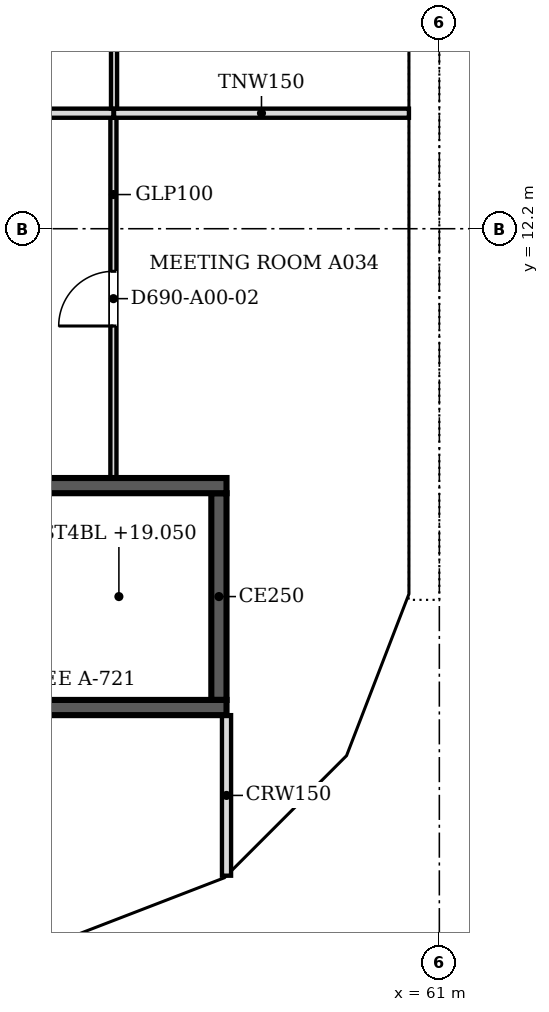
"""IFC4 building model, lengths in metres.
Left out: names, types, materials, properties, quantities, classifications, styles, units other than length and angle.
Written with IfcOpenShell. Run it as: python <this file> out.ifc"""

import sys

from ifc_helpers import new_model, si_unit, direction, frame, frame_2d, origin, place, context, subcontext, project, spatial, polyline, rectangle, outline, extrude, faceted_brep, source, transform, mapped, element, fill, save


model = new_model("IFC4")
c1 = context("Model", 3, precision=1e-05, world=origin(), true_north=direction((0.0, 1.0)))
c2 = subcontext(c1, "Body", "Model", "MODEL_VIEW")
j1 = project(units=[si_unit("LENGTHUNIT", "METRE"), si_unit("PLANEANGLEUNIT", "RADIAN")], contexts=[c1])
p1 = place(None, origin())
s1 = spatial("IfcSite", under=j1, at=p1, CompositionType="ELEMENT")
p2 = place(p1, origin())
s2 = spatial("IfcBuilding", under=s1, at=p2, CompositionType="ELEMENT")
p3 = place(p2, frame((0.0, 0.0, 16.8)))
s3 = spatial("IfcBuildingStorey", under=s2, at=p3, CompositionType="ELEMENT", Elevation=16.8)
m1 = source(origin(), c2, "Body", "Brep", [
    faceted_brep([(2.997, -0.25, 0.0), (0.047, -0.25, 4.5), (0.0, -0.25, 4.43), (0.0, -0.25, 0.0), (0.093, 0.25, 4.429), (2.944, 0.25, 0.081), (2.944, 0.25, 0.0), (0.093, 0.25, 0.0), (0.047, 0.0, 4.5), (2.997, 0.0, 0.0)], [[[0, 1, 2, 3]], [[4, 5, 6, 7]], [[5, 4, 8, 1, 0, 9]], [[2, 1, 8]], [[7, 6, 9, 0, 3]], [[7, 3, 2, 8, 4]], [[9, 6, 5]]]),
])
p4 = place(p3, frame((54.81, 0.233, 0.0), z_axis=(0.0, 0.0, 1.0), x_axis=(0.932990326376, 0.359901446078, 0.0)))
e1 = element("IfcWall", 1, at=p4, inside=s3, PredefinedType="SOLIDWALL", context=c2, shape_type="MappedRepresentation", body=[
    mapped(m1, transform((0.0, 0.0, 0.0), scale=1.0)),
])
m2 = source(origin(), c2, "Body", "SweptSolid", [
    extrude(outline(polyline([(2.534, 0.25), (0.247, 3.739), (0.247, 0.25), (2.534, 0.25)])), frame((0.0, 0.26, 0.0), z_axis=(0.0, -1.0, 0.0), x_axis=(1.0, 0.0, 0.0)), (0.0, 0.0, 1.0), 0.52),
])
p5 = place(p4, origin())
e2 = element("IfcOpeningElement", 2, at=p5, cuts=e1, PredefinedType="OPENING", context=c2, shape_type="MappedRepresentation", body=[
    mapped(m2, transform((0.0, 0.0, 0.0), scale=1.0)),
])
m3 = source(origin(), c2, "Body", "Brep", [
    faceted_brep([(2.997, -0.25, 4.419), (2.944, -0.25, 4.5), (0.0, -0.25, 0.0), (2.997, -0.25, 0.0), (0.053, 0.25, 0.081), (2.891, 0.25, 4.419), (2.891, 0.25, 0.0), (0.053, 0.25, 0.0), (2.944, 0.0, 4.5), (0.0, 0.0, 0.0)], [[[0, 1, 2, 3]], [[4, 5, 6, 7]], [[8, 1, 0]], [[5, 4, 9, 2, 1, 8]], [[7, 6, 3, 2, 9]], [[7, 9, 4]], [[3, 6, 5, 8, 0]]]),
])
p6 = place(p3, frame((57.606, 1.312, 0.0), z_axis=(0.0, 0.0, 1.0), x_axis=(0.707147509625, 0.707066050402, 0.0)))
e3 = element("IfcWall", 3, at=p6, inside=s3, PredefinedType="SOLIDWALL", context=c2, shape_type="MappedRepresentation", body=[
    mapped(m3, transform((0.0, 0.0, 0.0), scale=1.0)),
])
m4 = source(origin(), c2, "Body", "SweptSolid", [
    extrude(outline(polyline([(2.744, 3.738), (0.462, 0.25), (2.744, 0.25), (2.744, 3.738)])), frame((0.0, 0.26, 0.0), z_axis=(0.0, -1.0, 0.0), x_axis=(1.0, 0.0, 0.0)), (0.0, 0.0, 1.0), 0.52),
])
p7 = place(p6, origin())
e4 = element("IfcOpeningElement", 4, at=p7, cuts=e3, PredefinedType="OPENING", context=c2, shape_type="MappedRepresentation", body=[
    mapped(m4, transform((0.0, 0.0, 0.0), scale=1.0)),
])
m5 = source(origin(), c2, "Body", "Brep", [
    faceted_brep([(3.003, -0.25, 0.0), (0.053, -0.25, 4.5), (0.0, -0.25, 4.419), (0.0, -0.25, 0.0), (0.106, 0.25, 4.419), (2.957, 0.25, 0.071), (2.957, 0.25, 0.0), (0.106, 0.25, 0.0), (0.053, 0.0, 4.5), (3.003, 0.0, 0.0)], [[[0, 1, 2, 3]], [[4, 5, 6, 7]], [[5, 4, 8, 1, 0, 9]], [[2, 1, 8]], [[7, 6, 9, 0, 3]], [[7, 3, 2, 8, 4]], [[9, 6, 5]]]),
])
p8 = place(p3, frame((59.669, 3.344, 0.0), z_axis=(0.0, 0.0, 1.0), x_axis=(0.35992665181, 0.932980602862, 0.0)))
e5 = element("IfcWall", 5, at=p8, inside=s3, PredefinedType="SOLIDWALL", context=c2, shape_type="MappedRepresentation", body=[
    mapped(m5, transform((0.0, 0.0, 0.0), scale=1.0)),
])
m6 = source(origin(), c2, "Body", "SweptSolid", [
    extrude(outline(polyline([(2.541, 0.25), (0.253, 3.739), (0.253, 0.25), (2.541, 0.25)])), frame((0.0, 0.26, 0.0), z_axis=(0.0, -1.0, 0.0), x_axis=(1.0, 0.0, 0.0)), (0.0, 0.0, 1.0), 0.52),
])
p9 = place(p8, origin())
e6 = element("IfcOpeningElement", 6, at=p9, cuts=e5, PredefinedType="OPENING", context=c2, shape_type="MappedRepresentation", body=[
    mapped(m6, transform((0.0, 0.0, 0.0), scale=1.0)),
])
m7 = source(origin(), c2, "Body", "Brep", [
    faceted_brep([(6.053, -0.25, 0.0), (3.003, -0.25, 4.5), (0.0, -0.25, 0.0), (0.047, 0.25, 0.07), (3.003, 0.25, 4.5), (6.053, 0.25, 0.0), (0.047, 0.25, 0.0), (0.0, 0.0, 0.0)], [[[0, 1, 2]], [[3, 4, 5, 6]], [[5, 4, 1, 0]], [[4, 3, 7, 2, 1]], [[6, 5, 0, 2, 7]], [[6, 7, 3]]]),
])
p10 = place(p3, frame((60.75, 6.146, 0.0), z_axis=(0.0, 0.0, 1.0), x_axis=(0.0, 1.0, 0.0)))
e7 = element("IfcWall", 7, at=p10, inside=s3, PredefinedType="SOLIDWALL", context=c2, shape_type="MappedRepresentation", body=[
    mapped(m7, transform((0.0, 0.0, 0.0), scale=1.0)),
])
m8 = source(origin(), c2, "Body", "SweptSolid", [
    extrude(outline(polyline([(5.582, 0.25), (3.005, 4.052), (0.468, 0.25), (5.582, 0.25)])), frame((0.0, 0.26, 0.0), z_axis=(0.0, -1.0, 0.0), x_axis=(1.0, 0.0, 0.0)), (0.0, 0.0, 1.0), 0.52),
])
p11 = place(p10, origin())
e8 = element("IfcOpeningElement", 8, at=p11, cuts=e7, PredefinedType="OPENING", context=c2, shape_type="MappedRepresentation", body=[
    mapped(m8, transform((0.0, 0.0, 0.0), scale=1.0)),
])
m9 = source(origin(), c2, "Body", "SweptSolid", [
    extrude(outline(polyline([(6.1, 0.0), (3.05, 4.5), (0.0, 0.0), (6.1, 0.0)])), frame((0.0, 0.25, 0.0), z_axis=(0.0, -1.0, 0.0), x_axis=(1.0, 0.0, 0.0)), (0.0, 0.0, 1.0), 0.5),
])
p12 = place(p3, frame((60.75, 12.2, 0.0), z_axis=(0.0, 0.0, 1.0), x_axis=(0.0, 1.0, 0.0)))
e9 = element("IfcWall", 9, at=p12, inside=s3, PredefinedType="SOLIDWALL", context=c2, shape_type="MappedRepresentation", body=[
    mapped(m9, transform((0.0, 0.0, 0.0), scale=1.0)),
])
m10 = source(origin(), c2, "Body", "SweptSolid", [
    extrude(outline(polyline([(5.629, 0.25), (3.05, 4.054), (0.471, 0.25), (5.629, 0.25)])), frame((0.0, 0.26, 0.0), z_axis=(0.0, -1.0, 0.0), x_axis=(1.0, 0.0, 0.0)), (0.0, 0.0, 1.0), 0.52),
])
p13 = place(p12, origin())
e10 = element("IfcOpeningElement", 10, at=p13, cuts=e9, PredefinedType="OPENING", context=c2, shape_type="MappedRepresentation", body=[
    mapped(m10, transform((0.0, 0.0, 0.0), scale=1.0)),
])
p14 = place(p2, frame((0.0, 0.0, 21.3)))
s4 = spatial("IfcBuildingStorey", under=s2, at=p14, CompositionType="ELEMENT", Elevation=21.3)
m11 = source(origin(), c2, "Body", "Brep", [
    faceted_brep([(2.95, -0.25, 0.0), (3.003, -0.25, 0.081), (3.003, -0.25, 8.919), (2.95, -0.25, 9.0), (0.0, -0.25, 4.5), (0.047, 0.25, 4.571), (2.898, 0.25, 8.919), (2.898, 0.25, 0.081), (0.047, 0.25, 4.429), (2.95, 0.0, 0.0), (2.95, 0.0, 9.0), (0.0, 0.0, 4.5)], [[[0, 1, 2, 3, 4]], [[5, 6, 7, 8]], [[1, 0, 9]], [[10, 3, 2]], [[6, 5, 11, 4, 3, 10]], [[8, 7, 9, 0, 4, 11]], [[8, 11, 5]], [[1, 9, 7, 6, 10, 2]]]),
])
p15 = place(p14, frame((54.854, 0.25, -4.5), z_axis=(0.0, 0.0, 1.0), x_axis=(0.932970071518, 0.359953949349, 0.0)))
e11 = element("IfcWall", 11, at=p15, inside=s4, PredefinedType="SOLIDWALL", context=c2, shape_type="MappedRepresentation", body=[
    mapped(m11, transform((0.0, 0.0, 0.0), scale=1.0)),
])
m12 = source(origin(), c2, "Body", "SweptSolid", [
    extrude(outline(polyline([(2.75, 8.239), (0.299, 4.5), (2.75, 0.761), (2.75, 8.239)])), frame((0.0, 0.26, 0.0), z_axis=(0.0, -1.0, 0.0), x_axis=(1.0, 0.0, 0.0)), (0.0, 0.0, 1.0), 0.52),
])
p16 = place(p15, origin())
e12 = element("IfcOpeningElement", 12, at=p16, cuts=e11, PredefinedType="OPENING", context=c2, shape_type="MappedRepresentation", body=[
    mapped(m12, transform((0.0, 0.0, 0.0), scale=1.0)),
])
m13 = source(origin(), c2, "Body", "Brep", [
    faceted_brep([(0.053, -0.25, 0.0), (2.997, -0.25, 4.5), (0.053, -0.25, 9.0), (0.0, -0.25, 8.919), (0.0, -0.25, 0.081), (0.106, 0.25, 8.919), (2.944, 0.25, 4.581), (2.944, 0.25, 4.419), (0.106, 0.25, 0.081), (2.997, 0.0, 4.5), (0.053, 0.0, 0.0), (0.053, 0.0, 9.0)], [[[0, 1, 2, 3, 4]], [[5, 6, 7, 8]], [[8, 7, 9, 1, 0, 10]], [[6, 5, 11, 2, 1, 9]], [[3, 2, 11]], [[10, 0, 4]], [[8, 10, 4, 3, 11, 5]], [[9, 7, 6]]]),
])
p17 = place(p14, frame((57.569, 1.274, -4.5), z_axis=(0.0, 0.0, 1.0), x_axis=(0.707066050402, 0.707147509625, 0.0)))
e13 = element("IfcWall", 13, at=p17, inside=s4, PredefinedType="SOLIDWALL", context=c2, shape_type="MappedRepresentation", body=[
    mapped(m13, transform((0.0, 0.0, 0.0), scale=1.0)),
])
m14 = source(origin(), c2, "Body", "SweptSolid", [
    extrude(outline(polyline([(0.253, 0.762), (2.698, 4.5), (0.253, 8.238), (0.253, 0.762)])), frame((0.0, 0.26, 0.0), z_axis=(0.0, -1.0, 0.0), x_axis=(1.0, 0.0, 0.0)), (0.0, 0.0, 1.0), 0.52),
])
p18 = place(p17, origin())
e14 = element("IfcOpeningElement", 14, at=p18, cuts=e13, PredefinedType="OPENING", context=c2, shape_type="MappedRepresentation", body=[
    mapped(m14, transform((0.0, 0.0, 0.0), scale=1.0)),
])
m15 = source(origin(), c2, "Body", "Brep", [
    faceted_brep([(2.95, -0.25, 0.0), (2.997, -0.25, 0.07), (2.997, -0.25, 8.93), (2.95, -0.25, 9.0), (0.0, -0.25, 4.5), (0.053, 0.25, 4.581), (2.904, 0.25, 8.929), (2.904, 0.25, 0.071), (0.053, 0.25, 4.419), (2.95, 0.0, 0.0), (2.95, 0.0, 9.0), (0.0, 0.0, 4.5)], [[[0, 1, 2, 3, 4]], [[5, 6, 7, 8]], [[1, 0, 9]], [[10, 3, 2]], [[6, 5, 11, 4, 3, 10]], [[8, 7, 9, 0, 4, 11]], [[8, 11, 5]], [[1, 9, 7, 6, 10, 2]]]),
])
p19 = place(p14, frame((59.688, 3.394, -4.5), z_axis=(0.0, 0.0, 1.0), x_axis=(0.359972353723, 0.932962970624, 0.0)))
e15 = element("IfcWall", 15, at=p19, inside=s4, PredefinedType="SOLIDWALL", context=c2, shape_type="MappedRepresentation", body=[
    mapped(m15, transform((0.0, 0.0, 0.0), scale=1.0)),
])
p20 = place(p19, origin())
e16 = element("IfcOpeningElement", 16, at=p20, cuts=e15, PredefinedType="OPENING", context=c2, shape_type="MappedRepresentation", body=[
    mapped(m12, transform((0.0, 0.0, 0.0), scale=1.0)),
])
m16 = source(origin(), c2, "Body", "Brep", [
    faceted_brep([(0.047, -0.25, 0.0), (3.05, -0.25, 4.5), (0.047, -0.25, 9.0), (0.0, -0.25, 8.929), (0.0, -0.25, 0.071), (0.093, 0.25, 8.93), (3.05, 0.25, 4.5), (0.093, 0.25, 0.07), (0.047, 0.0, 0.0), (0.047, 0.0, 9.0)], [[[0, 1, 2, 3, 4]], [[5, 6, 7]], [[7, 6, 1, 0, 8]], [[6, 5, 9, 2, 1]], [[3, 2, 9]], [[8, 0, 4]], [[7, 8, 4, 3, 9, 5]]]),
])
p21 = place(p14, frame((60.75, 6.1, -4.5), z_axis=(0.0, 0.0, 1.0), x_axis=(0.0, 1.0, 0.0)))
e17 = element("IfcWall", 17, at=p21, inside=s4, PredefinedType="SOLIDWALL", context=c2, shape_type="MappedRepresentation", body=[
    mapped(m16, transform((0.0, 0.0, 0.0), scale=1.0)),
])
m17 = source(origin(), c2, "Body", "SweptSolid", [
    extrude(outline(polyline([(0.247, 0.75), (2.75, 4.5), (0.247, 8.25), (0.247, 0.75)])), frame((0.0, 0.26, 0.0), z_axis=(0.0, -1.0, 0.0), x_axis=(1.0, 0.0, 0.0)), (0.0, 0.0, 1.0), 0.52),
])
p22 = place(p21, origin())
e18 = element("IfcOpeningElement", 18, at=p22, cuts=e17, PredefinedType="OPENING", context=c2, shape_type="MappedRepresentation", body=[
    mapped(m17, transform((0.0, 0.0, 0.0), scale=1.0)),
])
m18 = source(origin(), c2, "Body", "SweptSolid", [
    extrude(outline(polyline([(3.05, 0.0), (6.1, 4.5), (3.05, 9.0), (0.0, 4.5), (3.05, 0.0)])), frame((0.0, 0.25, 0.0), z_axis=(0.0, -1.0, 0.0), x_axis=(1.0, 0.0, 0.0)), (0.0, 0.0, 1.0), 0.5),
])
p23 = place(p14, frame((60.75, 9.15, -4.5), z_axis=(0.0, 0.0, 1.0), x_axis=(0.0, 1.0, 0.0)))
e19 = element("IfcWall", 19, at=p23, inside=s4, PredefinedType="SOLIDWALL", context=c2, shape_type="MappedRepresentation", body=[
    mapped(m18, transform((0.0, 0.0, 0.0), scale=1.0)),
])
m19 = source(origin(), c2, "Body", "SweptSolid", [
    extrude(outline(polyline([(3.05, 0.446), (5.798, 4.5), (3.05, 8.554), (0.302, 4.5), (3.05, 0.446)])), frame((0.0, 0.26, 0.0), z_axis=(0.0, -1.0, 0.0), x_axis=(1.0, 0.0, 0.0)), (0.0, 0.0, 1.0), 0.52),
])
p24 = place(p23, origin())
e20 = element("IfcOpeningElement", 20, at=p24, cuts=e19, PredefinedType="OPENING", context=c2, shape_type="MappedRepresentation", body=[
    mapped(m19, transform((0.0, 0.0, 0.0), scale=1.0)),
])
p25 = place(p3, frame((57.5, 4.325, 0.0), z_axis=(0.0, 0.0, 1.0), x_axis=(-1.0, 0.0, 0.0)))
e21 = element("IfcWall", 21, at=p25, inside=s3, PredefinedType="SOLIDWALL", context=c2, shape_type="SweptSolid", body=[
    extrude(rectangle(XDim=8.5, YDim=0.25, at=frame_2d((4.25, 0.0))), origin(), (0.0, 0.0, 1.0), 4.5),
])
m20 = source(origin(), c2, "Body", "SweptSolid", [
    extrude(rectangle(XDim=1.2, YDim=2.1, at=frame_2d((0.6, 1.05))), frame((0.0, 0.135, 0.0), z_axis=(0.0, -1.0, 0.0), x_axis=(1.0, 0.0, 0.0)), (0.0, 0.0, 1.0), 0.27),
])
p26 = place(p25, frame((6.9, 0.0, 0.0)))
e22 = element("IfcOpeningElement", 22, at=p26, cuts=e21, PredefinedType="OPENING", context=c2, shape_type="MappedRepresentation", body=[
    mapped(m20, transform((0.0, 0.0, 0.0), scale=1.0)),
])
p27 = place(p3, frame((49.0, 7.975, 0.0), z_axis=(0.0, 0.0, 1.0), x_axis=(1.0, 0.0, 0.0)))
e23 = element("IfcWall", 23, at=p27, inside=s3, PredefinedType="SOLIDWALL", context=c2, shape_type="SweptSolid", body=[
    extrude(rectangle(XDim=8.5, YDim=0.25, at=frame_2d((4.25, 0.0))), origin(), (0.0, 0.0, 1.0), 4.5),
])
p28 = place(p3, frame((57.375, 7.85, 0.0), z_axis=(0.0, 0.0, 1.0), x_axis=(0.0, -1.0, 0.0)))
e24 = element("IfcWall", 24, at=p28, inside=s3, PredefinedType="SOLIDWALL", context=c2, shape_type="SweptSolid", body=[
    extrude(rectangle(XDim=3.4, YDim=0.25, at=frame_2d((1.7, 0.0))), origin(), (0.0, 0.0, 1.0), 4.5),
])
p29 = place(p3, frame((57.5, 1.559, 0.0), z_axis=(0.0, 0.0, 1.0), x_axis=(0.0, 1.0, 0.0)))
e25 = element("IfcWall", 25, at=p29, inside=s3, PredefinedType="PARTITIONING", context=c2, shape_type="SweptSolid", body=[
    extrude(rectangle(XDim=2.641, YDim=0.15, at=frame_2d((1.32, 0.0))), origin(), (0.0, 0.0, 1.0), 3.415),
])
p30 = place(p3, frame((55.64, 14.024, 0.0), z_axis=(0.0, 0.0, 1.0), x_axis=(0.0, -1.0, 0.0)))
e26 = element("IfcWall", 26, at=p30, inside=s3, PredefinedType="PARTITIONING", context=c2, shape_type="SweptSolid", body=[
    extrude(rectangle(XDim=5.924, YDim=0.1, at=frame_2d((2.962, 0.0))), origin(), (0.0, 0.0, 1.0), 3.415),
])
m21 = source(origin(), c2, "Body", "SweptSolid", [
    extrude(rectangle(XDim=0.9, YDim=2.1, at=frame_2d((0.45, 1.05))), frame((0.0, 0.06, 0.0), z_axis=(0.0, -1.0, 0.0), x_axis=(1.0, 0.0, 0.0)), (0.0, 0.0, 1.0), 0.12),
])
p31 = place(p30, frame((2.524, 0.0, 0.0)))
e27 = element("IfcOpeningElement", 27, at=p31, cuts=e26, PredefinedType="OPENING", context=c2, shape_type="MappedRepresentation", body=[
    mapped(m21, transform((0.0, 0.0, 0.0), scale=1.0)),
])
p32 = place(p3, frame((46.476, 14.1, 0.0), z_axis=(0.0, 0.0, 1.0), x_axis=(1.0, 0.0, 0.0)))
e28 = element("IfcWall", 28, at=p32, inside=s3, PredefinedType="PARTITIONING", context=c2, shape_type="SweptSolid", body=[
    extrude(rectangle(XDim=9.164, YDim=0.15, at=frame_2d((4.582, 0.0))), origin(), (0.0, 0.0, 1.0), 3.415),
])
p33 = place(p3, frame((55.65, 14.1, 0.0), z_axis=(0.0, 0.0, 1.0), x_axis=(1.0, 0.0, 0.0)))
e29 = element("IfcWall", 29, at=p33, inside=s3, PredefinedType="PARTITIONING", context=c2, shape_type="SweptSolid", body=[
    extrude(rectangle(XDim=4.85, YDim=0.15, at=frame_2d((2.425, 0.0))), origin(), (0.0, 0.0, 1.0), 3.415),
])
p34 = place(p3, frame((55.65, 21.924, 0.0), z_axis=(0.0, 0.0, 1.0), x_axis=(0.0, -1.0, 0.0)))
e30 = element("IfcWall", 30, at=p34, inside=s3, PredefinedType="PARTITIONING", context=c2, shape_type="SweptSolid", body=[
    extrude(rectangle(XDim=7.748, YDim=0.1, at=frame_2d((3.874, 0.0))), origin(), (0.0, 0.0, 1.0), 3.415),
])
p35 = place(p34, frame((3.448, 0.0, 0.0)))
e31 = element("IfcOpeningElement", 31, at=p35, cuts=e30, PredefinedType="OPENING", context=c2, shape_type="MappedRepresentation", body=[
    mapped(m21, transform((0.0, 0.0, 0.0), scale=1.0)),
])
m22 = source(origin(), c2, "Body", "SweptSolid", [
    extrude(rectangle(XDim=0.9, YDim=2.1, at=frame_2d((0.45, 1.05))), frame((0.0, 0.025, 0.0), z_axis=(0.0, -1.0, 0.0), x_axis=(1.0, 0.0, 0.0)), (0.0, 0.0, 1.0), 0.05),
])
p36 = place(p31, origin())
e32 = element("IfcDoor", 32, at=p36, inside=s3, OperationType="SINGLE_SWING_RIGHT", PredefinedType="DOOR", context=c2, shape_type="MappedRepresentation", body=[
    mapped(m22, transform((0.0, 0.0, 0.0), scale=1.0)),
])
fill(e27, e32)
save(model, sys.argv[1])
